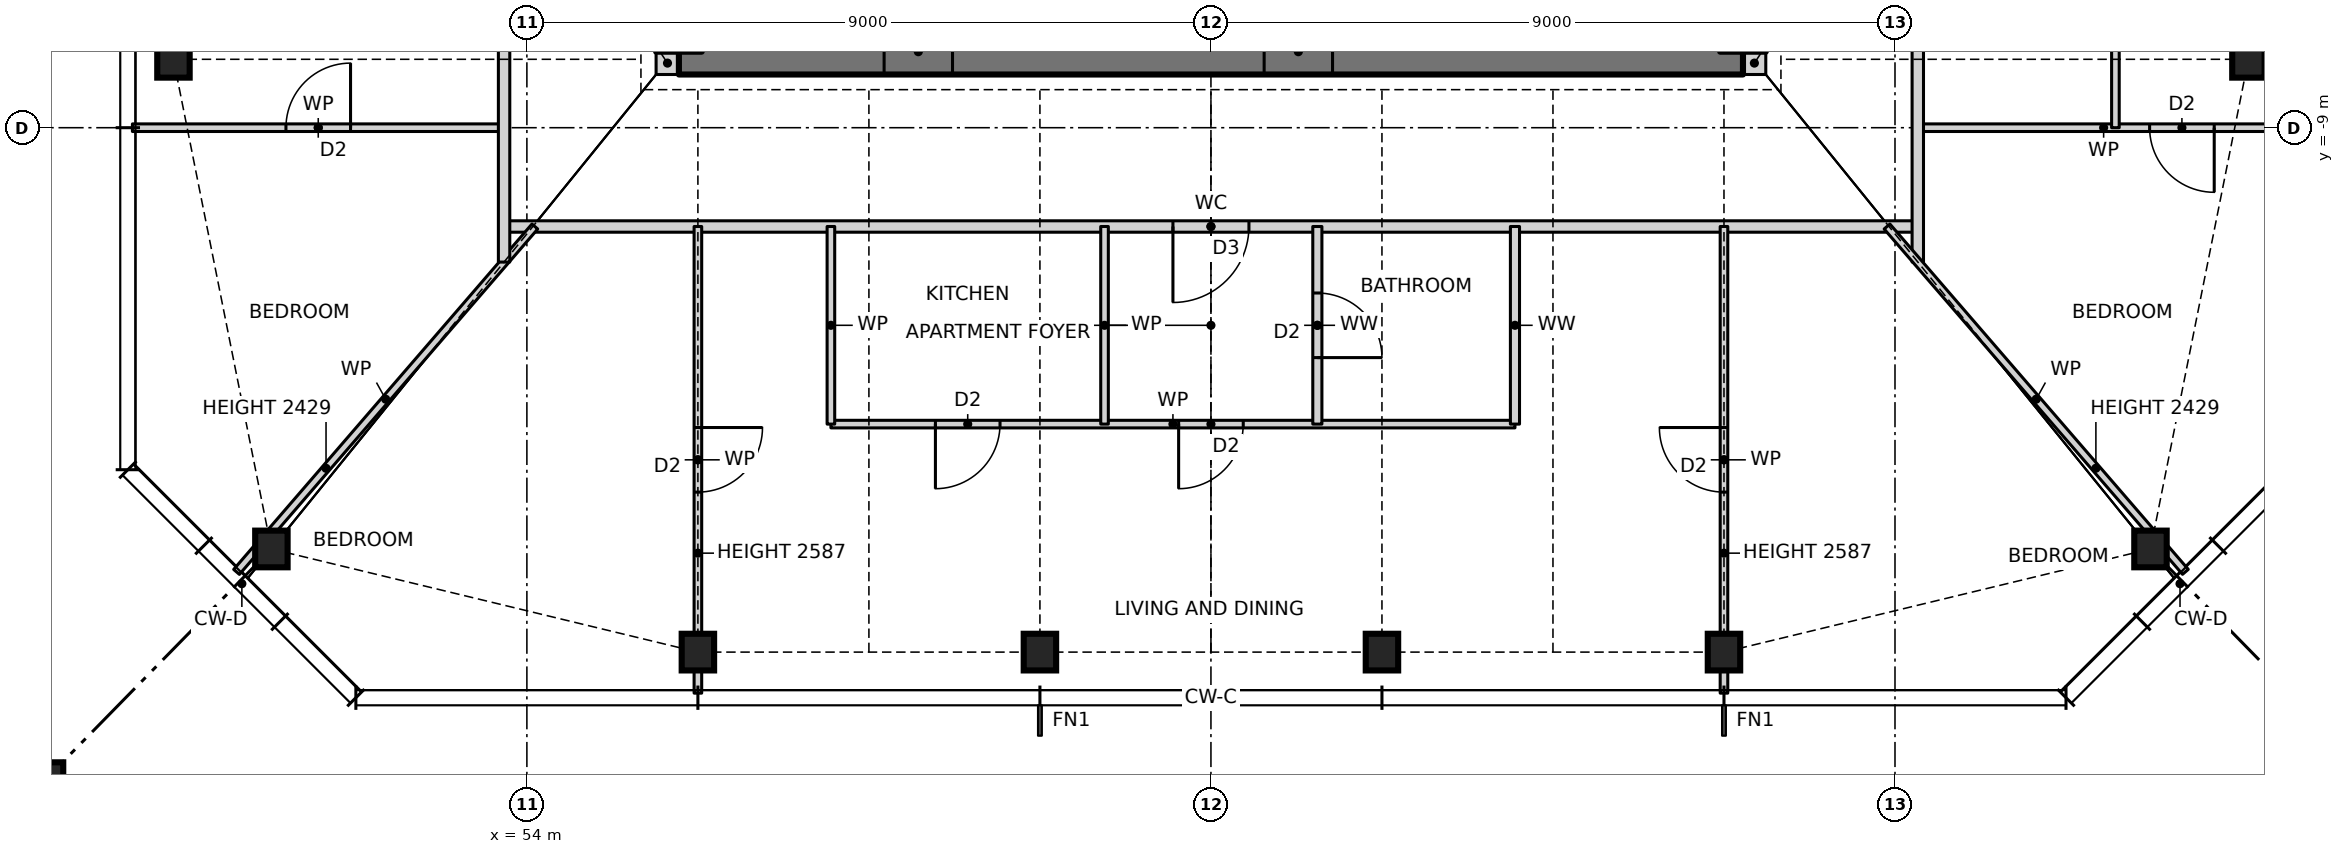
"""IFC4 building model, lengths in metres.
Left out: names, types, materials, properties, quantities, classifications, styles, units other than length and angle.
Written with IfcOpenShell. Run it as: python <this file> out.ifc"""

import sys

from ifc_helpers import new_model, si_unit, direction, frame, frame_2d, origin, origin_2d, place, context, subcontext, project, spatial, rectangle, hollow_rectangle, i_section, extrude, element, fill, save


model = new_model("IFC4")
c1 = context("Model", 3, precision=1e-05, world=origin(), true_north=direction((0.0, 1.0)))
c2 = subcontext(c1, "Body", "Model", "MODEL_VIEW")
j1 = project(units=[si_unit("LENGTHUNIT", "METRE"), si_unit("PLANEANGLEUNIT", "RADIAN")], contexts=[c1])
p1 = place(None, origin())
s1 = spatial("IfcSite", under=j1, at=p1, CompositionType="ELEMENT")
p2 = place(p1, origin())
s2 = spatial("IfcBuilding", under=s1, at=p2, CompositionType="ELEMENT")
p3 = place(p2, frame((0.0, 0.0, 101.5)))
s3 = spatial("IfcBuildingStorey", under=s2, at=p3, CompositionType="ELEMENT", Elevation=101.5)
for number, where, z_axis, x_axis in (
    (1, (50.639, -14.543, 0.0), (0.0, 0.0, 1.0), (1.0, 0.0, 0.0)),
    (2, (56.25, -15.9, 0.0), (0.0, 0.0, 1.0), (1.0, 0.0, 0.0)),
    (3, (60.75, -15.9, 0.0), (0.0, 0.0, 1.0), (1.0, 0.0, 0.0)),
    (4, (65.25, -15.9, 0.0), (0.0, 0.0, 1.0), (1.0, 0.0, 0.0)),
    (5, (69.75, -15.9, 0.0), (0.0, 0.0, 1.0), (1.0, 0.0, 0.0)),
    (6, (75.361, -14.543, 0.0), (0.0, 0.0, 1.0), (1.0, 0.0, 0.0)),
    (7, (76.65, -8.1, 0.0), (0.0, 0.0, 1.0), (1.0, 0.0, 0.0)),
    (8, (49.35, -8.1, 0.0), (0.0, 0.0, 1.0), (1.0, 0.0, 0.0)),
):
    element("IfcColumn", number, at=place(p3, frame(where, z_axis=z_axis, x_axis=x_axis)), inside=s3, PredefinedType="COLUMN", context=c2, shape_type="SweptSolid", body=[
        extrude(i_section(OverallWidth=0.427, OverallDepth=0.483, WebThickness=0.051, FlangeThickness=0.082, at=origin_2d()), origin(), (0.0, 0.0, 1.0), 3.5),
    ])
p4 = place(p3, frame((47.35, -17.9, 0.0), z_axis=(0.0, 0.0, 1.0), x_axis=(1.0, 0.0, 0.0)))
e9 = element("IfcColumn", 9, at=p4, inside=s3, PredefinedType="COLUMN", context=c2, shape_type="SweptSolid", body=[
    extrude(hollow_rectangle(XDim=1.1, YDim=1.1, WallThickness=0.06, at=origin_2d()), origin(), (0.0, 0.0, 1.0), 3.5),
])
for number, where, z_axis, x_axis in (
    (10, (55.7, -8.15, 0.0), (0.0, 0.0, 1.0), (1.0, 0.0, 0.0)),
    (11, (70.0, -8.15, 0.0), (0.0, 0.0, 1.0), (1.0, 0.0, 0.0)),
):
    element("IfcWall", number, at=place(p3, frame(where, z_axis=z_axis, x_axis=x_axis)), inside=s3, PredefinedType="SOLIDWALL", context=c2, shape_type="SweptSolid", body=[
        extrude(rectangle(XDim=0.3, YDim=0.3, at=frame_2d((0.15, 0.0))), origin(), (0.0, 0.0, 1.0), 3.5),
    ])
p5 = place(p3, frame((56.0, -8.0, 0.0), z_axis=(0.0, 0.0, 1.0), x_axis=(1.0, 0.0, 0.0)))
e12 = element("IfcWall", 12, at=p5, inside=s3, PredefinedType="SHEAR", context=c2, shape_type="SweptSolid", body=[
    extrude(rectangle(XDim=14.0, YDim=0.6, at=frame_2d((7.0, 0.0))), origin(), (0.0, 0.0, 1.0), 3.5),
])
p6 = place(p5, frame((2.7, 0.0, 0.0)))
e13 = element("IfcOpeningElement", 13, at=p6, cuts=e12, PredefinedType="OPENING", context=c2, shape_type="SweptSolid", body=[
    extrude(rectangle(XDim=0.9, YDim=2.1, at=frame_2d((0.45, 1.05))), frame((0.0, 0.31, 0.0), z_axis=(0.0, -1.0, 0.0), x_axis=(1.0, 0.0, 0.0)), (0.0, 0.0, 1.0), 0.62),
])
p7 = place(p5, frame((7.7, 0.0, 0.0)))
e14 = element("IfcOpeningElement", 14, at=p7, cuts=e12, PredefinedType="OPENING", context=c2, shape_type="SweptSolid", body=[
    extrude(rectangle(XDim=0.9, YDim=2.1, at=frame_2d((0.45, 1.05))), frame((0.0, 0.31, 0.0), z_axis=(0.0, -1.0, 0.0), x_axis=(1.0, 0.0, 0.0)), (0.0, 0.0, 1.0), 0.62),
])
p8 = place(p3, frame((58.0, -12.9, 0.0), z_axis=(0.0, 0.0, 1.0), x_axis=(1.0, 0.0, 0.0)))
e15 = element("IfcWall", 15, at=p8, inside=s3, PredefinedType="PARTITIONING", context=c2, shape_type="SweptSolid", body=[
    extrude(rectangle(XDim=9.0, YDim=0.1, at=frame_2d((4.5, 0.0))), origin(), (0.0, 0.0, 1.0), 3.27),
])
p9 = place(p8, frame((1.375, 0.0, 0.0)))
e16 = element("IfcOpeningElement", 16, at=p9, cuts=e15, PredefinedType="OPENING", context=c2, shape_type="SweptSolid", body=[
    extrude(rectangle(XDim=0.85, YDim=2.1, at=frame_2d((0.425, 1.05))), frame((0.0, 0.06, 0.0), z_axis=(0.0, -1.0, 0.0), x_axis=(1.0, 0.0, 0.0)), (0.0, 0.0, 1.0), 0.12),
])
p10 = place(p8, frame((4.575, 0.0, 0.0)))
e17 = element("IfcOpeningElement", 17, at=p10, cuts=e15, PredefinedType="OPENING", context=c2, shape_type="SweptSolid", body=[
    extrude(rectangle(XDim=0.85, YDim=2.1, at=frame_2d((0.425, 1.05))), frame((0.0, 0.06, 0.0), z_axis=(0.0, -1.0, 0.0), x_axis=(1.0, 0.0, 0.0)), (0.0, 0.0, 1.0), 0.12),
])
p11 = place(p3, frame((53.7, -10.3, 0.0), z_axis=(0.0, 0.0, 1.0), x_axis=(1.0, 0.0, 0.0)))
e18 = element("IfcWall", 18, at=p11, inside=s3, PredefinedType="PARTITIONING", context=c2, shape_type="SweptSolid", body=[
    extrude(rectangle(XDim=18.6, YDim=0.15, at=frame_2d((9.3, 0.0))), origin(), (0.0, 0.0, 1.0), 3.27),
])
p12 = place(p11, frame((8.8, 0.0, 0.0)))
e19 = element("IfcOpeningElement", 19, at=p12, cuts=e18, PredefinedType="OPENING", context=c2, shape_type="SweptSolid", body=[
    extrude(rectangle(XDim=1.0, YDim=2.1, at=frame_2d((0.5, 1.05))), frame((0.0, 0.085, 0.0), z_axis=(0.0, -1.0, 0.0), x_axis=(1.0, 0.0, 0.0)), (0.0, 0.0, 1.0), 0.17),
])
p13 = place(p3, frame((48.81, -9.0, 0.0), z_axis=(0.0, 0.0, 1.0), x_axis=(1.0, 0.0, 0.0)))
e20 = element("IfcWall", 20, at=p13, inside=s3, PredefinedType="PARTITIONING", context=c2, shape_type="SweptSolid", body=[
    extrude(rectangle(XDim=4.89, YDim=0.1, at=frame_2d((2.445, 0.0))), origin(), (0.0, 0.0, 1.0), 3.27),
])
p14 = place(p13, frame((2.02, 0.0, 0.0)))
e21 = element("IfcOpeningElement", 21, at=p14, cuts=e20, PredefinedType="OPENING", context=c2, shape_type="SweptSolid", body=[
    extrude(rectangle(XDim=0.85, YDim=2.1, at=frame_2d((0.425, 1.05))), frame((0.0, 0.06, 0.0), z_axis=(0.0, -1.0, 0.0), x_axis=(1.0, 0.0, 0.0)), (0.0, 0.0, 1.0), 0.12),
])
p15 = place(p3, frame((72.3, -9.0, 0.0), z_axis=(0.0, 0.0, 1.0), x_axis=(1.0, 0.0, 0.0)))
e22 = element("IfcWall", 22, at=p15, inside=s3, PredefinedType="PARTITIONING", context=c2, shape_type="SweptSolid", body=[
    extrude(rectangle(XDim=4.89, YDim=0.1, at=frame_2d((2.445, 0.0))), origin(), (0.0, 0.0, 1.0), 3.27),
])
p16 = place(p15, frame((3.05, 0.0, 0.0)))
e23 = element("IfcOpeningElement", 23, at=p16, cuts=e22, PredefinedType="OPENING", context=c2, shape_type="SweptSolid", body=[
    extrude(rectangle(XDim=0.85, YDim=2.1, at=frame_2d((0.425, 1.05))), frame((0.0, 0.06, 0.0), z_axis=(0.0, -1.0, 0.0), x_axis=(1.0, 0.0, 0.0)), (0.0, 0.0, 1.0), 0.12),
])
p17 = place(p3, frame((50.18, -14.845, 0.0), z_axis=(0.0, 0.0, 1.0), x_axis=(0.653585997703, 0.756852260092, 0.0)))
e24 = element("IfcWall", 24, at=p17, inside=s3, PredefinedType="PARTITIONING", context=c2, shape_type="SweptSolid", body=[
    extrude(rectangle(XDim=6.005, YDim=0.1, at=frame_2d((3.002, 0.0))), origin(), (0.0, 0.0, 1.0), 2.429),
])
p18 = place(p3, frame((74.9, -9.0, 0.0), z_axis=(0.0, 0.0, 1.0), x_axis=(0.0, 1.0, 0.0)))
e25 = element("IfcWall", 25, at=p18, inside=s3, PredefinedType="PARTITIONING", context=c2, shape_type="SweptSolid", body=[
    extrude(rectangle(XDim=9.0, YDim=0.1, at=frame_2d((4.5, 0.0))), origin(), (0.0, 0.0, 1.0), 3.27),
])
p19 = place(p18, frame((1.375, 0.0, 0.0)))
e26 = element("IfcOpeningElement", 26, at=p19, cuts=e25, PredefinedType="OPENING", context=c2, shape_type="SweptSolid", body=[
    extrude(rectangle(XDim=0.85, YDim=2.1, at=frame_2d((0.425, 1.05))), frame((0.0, 0.06, 0.0), z_axis=(0.0, -1.0, 0.0), x_axis=(1.0, 0.0, 0.0)), (0.0, 0.0, 1.0), 0.12),
])
p20 = place(p18, frame((4.575, 0.0, 0.0)))
e27 = element("IfcOpeningElement", 27, at=p20, cuts=e25, PredefinedType="OPENING", context=c2, shape_type="SweptSolid", body=[
    extrude(rectangle(XDim=0.85, YDim=2.1, at=frame_2d((0.425, 1.05))), frame((0.0, 0.06, 0.0), z_axis=(0.0, -1.0, 0.0), x_axis=(1.0, 0.0, 0.0)), (0.0, 0.0, 1.0), 0.12),
])
p21 = place(p3, frame((72.3, -10.768, 0.0), z_axis=(0.0, 0.0, 1.0), x_axis=(0.0, 1.0, 0.0)))
e28 = element("IfcWall", 28, at=p21, inside=s3, PredefinedType="PARTITIONING", context=c2, shape_type="SweptSolid", body=[
    extrude(rectangle(XDim=21.668, YDim=0.15, at=frame_2d((10.834, 0.0))), origin(), (0.0, 0.0, 1.0), 3.27),
])
p22 = place(p21, frame((6.268, 0.0, 0.0)))
e29 = element("IfcOpeningElement", 29, at=p22, cuts=e28, PredefinedType="OPENING", context=c2, shape_type="SweptSolid", body=[
    extrude(rectangle(XDim=1.0, YDim=2.1, at=frame_2d((0.5, 1.05))), frame((0.0, 0.085, 0.0), z_axis=(0.0, -1.0, 0.0), x_axis=(1.0, 0.0, 0.0)), (0.0, 0.0, 1.0), 0.17),
])
p23 = place(p21, frame((16.168, 0.0, 0.0)))
e30 = element("IfcOpeningElement", 30, at=p23, cuts=e28, PredefinedType="OPENING", context=c2, shape_type="SweptSolid", body=[
    extrude(rectangle(XDim=1.0, YDim=2.1, at=frame_2d((0.5, 1.05))), frame((0.0, 0.085, 0.0), z_axis=(0.0, -1.0, 0.0), x_axis=(1.0, 0.0, 0.0)), (0.0, 0.0, 1.0), 0.17),
])
p24 = place(p3, frame((69.75, -16.44, 0.0), z_axis=(0.0, 0.0, 1.0), x_axis=(0.0, 1.0, 0.0)))
e31 = element("IfcWall", 31, at=p24, inside=s3, PredefinedType="PARTITIONING", context=c2, shape_type="SweptSolid", body=[
    extrude(rectangle(XDim=6.14, YDim=0.1, at=frame_2d((3.07, 0.0))), origin(), (0.0, 0.0, 1.0), 2.587),
])
p25 = place(p24, frame((2.645, 0.0, 0.0)))
e32 = element("IfcOpeningElement", 32, at=p25, cuts=e31, PredefinedType="OPENING", context=c2, shape_type="SweptSolid", body=[
    extrude(rectangle(XDim=0.85, YDim=2.1, at=frame_2d((0.425, 1.05))), frame((0.0, 0.06, 0.0), z_axis=(0.0, -1.0, 0.0), x_axis=(1.0, 0.0, 0.0)), (0.0, 0.0, 1.0), 0.12),
])
p26 = place(p3, frame((67.0, -12.9, 0.0), z_axis=(0.0, 0.0, 1.0), x_axis=(0.0, 1.0, 0.0)))
e33 = element("IfcWall", 33, at=p26, inside=s3, PredefinedType="PARTITIONING", context=c2, shape_type="SweptSolid", body=[
    extrude(rectangle(XDim=2.6, YDim=0.12, at=frame_2d((1.3, 0.0))), origin(), (0.0, 0.0, 1.0), 3.27),
])
p27 = place(p3, frame((64.4, -12.9, 0.0), z_axis=(0.0, 0.0, 1.0), x_axis=(0.0, 1.0, 0.0)))
e34 = element("IfcWall", 34, at=p27, inside=s3, PredefinedType="PARTITIONING", context=c2, shape_type="SweptSolid", body=[
    extrude(rectangle(XDim=2.6, YDim=0.12, at=frame_2d((1.3, 0.0))), origin(), (0.0, 0.0, 1.0), 3.27),
])
p28 = place(p27, frame((0.875, 0.0, 0.0)))
e35 = element("IfcOpeningElement", 35, at=p28, cuts=e34, PredefinedType="OPENING", context=c2, shape_type="SweptSolid", body=[
    extrude(rectangle(XDim=0.85, YDim=2.1, at=frame_2d((0.425, 1.05))), frame((0.0, 0.07, 0.0), z_axis=(0.0, -1.0, 0.0), x_axis=(1.0, 0.0, 0.0)), (0.0, 0.0, 1.0), 0.14),
])
for number, where, z_axis, x_axis in (
    (36, (61.6, -12.9, 0.0), (0.0, 0.0, 1.0), (0.0, 1.0, 0.0)),
    (37, (58.0, -12.9, 0.0), (0.0, 0.0, 1.0), (0.0, 1.0, 0.0)),
):
    element("IfcWall", number, at=place(p3, frame(where, z_axis=z_axis, x_axis=x_axis)), inside=s3, PredefinedType="PARTITIONING", context=c2, shape_type="SweptSolid", body=[
        extrude(rectangle(XDim=2.6, YDim=0.1, at=frame_2d((1.3, 0.0))), origin(), (0.0, 0.0, 1.0), 3.27),
    ])
p29 = place(p3, frame((56.25, -16.44, 0.0), z_axis=(0.0, 0.0, 1.0), x_axis=(0.0, 1.0, 0.0)))
e38 = element("IfcWall", 38, at=p29, inside=s3, PredefinedType="PARTITIONING", context=c2, shape_type="SweptSolid", body=[
    extrude(rectangle(XDim=6.14, YDim=0.1, at=frame_2d((3.07, 0.0))), origin(), (0.0, 0.0, 1.0), 2.587),
])
p30 = place(p29, frame((2.645, 0.0, 0.0)))
e39 = element("IfcOpeningElement", 39, at=p30, cuts=e38, PredefinedType="OPENING", context=c2, shape_type="SweptSolid", body=[
    extrude(rectangle(XDim=0.85, YDim=2.1, at=frame_2d((0.425, 1.05))), frame((0.0, 0.06, 0.0), z_axis=(0.0, -1.0, 0.0), x_axis=(1.0, 0.0, 0.0)), (0.0, 0.0, 1.0), 0.12),
])
p31 = place(p3, frame((53.7, -10.768, 0.0), z_axis=(0.0, 0.0, 1.0), x_axis=(0.0, 1.0, 0.0)))
e40 = element("IfcWall", 40, at=p31, inside=s3, PredefinedType="PARTITIONING", context=c2, shape_type="SweptSolid", body=[
    extrude(rectangle(XDim=21.668, YDim=0.15, at=frame_2d((10.834, 0.0))), origin(), (0.0, 0.0, 1.0), 3.27),
])
p32 = place(p31, frame((10.268, 0.0, 0.0)))
e41 = element("IfcOpeningElement", 41, at=p32, cuts=e40, PredefinedType="OPENING", context=c2, shape_type="SweptSolid", body=[
    extrude(rectangle(XDim=1.0, YDim=2.1, at=frame_2d((0.5, 1.05))), frame((0.0, 0.085, 0.0), z_axis=(0.0, -1.0, 0.0), x_axis=(1.0, 0.0, 0.0)), (0.0, 0.0, 1.0), 0.17),
])
p33 = place(p3, frame((75.821, -14.844, 0.0), z_axis=(0.0, 0.0, 1.0), x_axis=(-0.65378286253, 0.756682211144, 0.0)))
e42 = element("IfcWall", 42, at=p33, inside=s3, PredefinedType="PARTITIONING", context=c2, shape_type="SweptSolid", body=[
    extrude(rectangle(XDim=6.005, YDim=0.1, at=frame_2d((3.002, 0.0))), origin(), (0.0, 0.0, 1.0), 2.429),
])
p34 = place(p9, frame((0.85, 0.0, 0.0), z_axis=(0.0, 0.0, 1.0), x_axis=(-1.0, 0.0, 0.0)))
e43 = element("IfcDoor", 43, at=p34, inside=s3, OperationType="SINGLE_SWING_RIGHT", PredefinedType="DOOR", context=c2, shape_type="SweptSolid", body=[
    extrude(rectangle(XDim=0.85, YDim=2.1, at=frame_2d((0.425, 1.05))), frame((0.0, 0.025, 0.0), z_axis=(0.0, -1.0, 0.0), x_axis=(1.0, 0.0, 0.0)), (0.0, 0.0, 1.0), 0.05),
])
fill(e16, e43)
p35 = place(p12, frame((1.0, 0.0, 0.0), z_axis=(0.0, 0.0, 1.0), x_axis=(-1.0, 0.0, 0.0)))
e44 = element("IfcDoor", 44, at=p35, inside=s3, OperationType="SINGLE_SWING_RIGHT", PredefinedType="DOOR", context=c2, shape_type="SweptSolid", body=[
    extrude(rectangle(XDim=1.0, YDim=2.1, at=frame_2d((0.5, 1.05))), frame((0.0, 0.025, 0.0), z_axis=(0.0, -1.0, 0.0), x_axis=(1.0, 0.0, 0.0)), (0.0, 0.0, 1.0), 0.05),
])
fill(e19, e44)
p36 = place(p10, frame((0.85, 0.0, 0.0), z_axis=(0.0, 0.0, 1.0), x_axis=(-1.0, 0.0, 0.0)))
e45 = element("IfcDoor", 45, at=p36, inside=s3, OperationType="SINGLE_SWING_RIGHT", PredefinedType="DOOR", context=c2, shape_type="SweptSolid", body=[
    extrude(rectangle(XDim=0.85, YDim=2.1, at=frame_2d((0.425, 1.05))), frame((0.0, 0.025, 0.0), z_axis=(0.0, -1.0, 0.0), x_axis=(1.0, 0.0, 0.0)), (0.0, 0.0, 1.0), 0.05),
])
fill(e17, e45)
p37 = place(p28, frame((0.85, 0.0, 0.0), z_axis=(0.0, 0.0, 1.0), x_axis=(-1.0, 0.0, 0.0)))
e46 = element("IfcDoor", 46, at=p37, inside=s3, OperationType="SINGLE_SWING_RIGHT", PredefinedType="DOOR", context=c2, shape_type="SweptSolid", body=[
    extrude(rectangle(XDim=0.85, YDim=2.1, at=frame_2d((0.425, 1.05))), frame((0.0, 0.025, 0.0), z_axis=(0.0, -1.0, 0.0), x_axis=(1.0, 0.0, 0.0)), (0.0, 0.0, 1.0), 0.05),
])
fill(e35, e46)
p38 = place(p30, frame((0.85, 0.0, 0.0), z_axis=(0.0, 0.0, 1.0), x_axis=(-1.0, 0.0, 0.0)))
e47 = element("IfcDoor", 47, at=p38, inside=s3, OperationType="SINGLE_SWING_LEFT", PredefinedType="DOOR", context=c2, shape_type="SweptSolid", body=[
    extrude(rectangle(XDim=0.85, YDim=2.1, at=frame_2d((0.425, 1.05))), frame((0.0, 0.025, 0.0), z_axis=(0.0, -1.0, 0.0), x_axis=(1.0, 0.0, 0.0)), (0.0, 0.0, 1.0), 0.05),
])
fill(e39, e47)
p39 = place(p25, origin())
e48 = element("IfcDoor", 48, at=p39, inside=s3, OperationType="SINGLE_SWING_RIGHT", PredefinedType="DOOR", context=c2, shape_type="SweptSolid", body=[
    extrude(rectangle(XDim=0.85, YDim=2.1, at=frame_2d((0.425, 1.05))), frame((0.0, 0.025, 0.0), z_axis=(0.0, -1.0, 0.0), x_axis=(1.0, 0.0, 0.0)), (0.0, 0.0, 1.0), 0.05),
])
fill(e32, e48)
p40 = place(p16, frame((0.85, 0.0, 0.0), z_axis=(0.0, 0.0, 1.0), x_axis=(-1.0, 0.0, 0.0)))
e49 = element("IfcDoor", 49, at=p40, inside=s3, OperationType="SINGLE_SWING_LEFT", PredefinedType="DOOR", context=c2, shape_type="SweptSolid", body=[
    extrude(rectangle(XDim=0.85, YDim=2.1, at=frame_2d((0.425, 1.05))), frame((0.0, 0.025, 0.0), z_axis=(0.0, -1.0, 0.0), x_axis=(1.0, 0.0, 0.0)), (0.0, 0.0, 1.0), 0.05),
])
fill(e23, e49)
p41 = place(p14, origin())
e50 = element("IfcDoor", 50, at=p41, inside=s3, OperationType="SINGLE_SWING_RIGHT", PredefinedType="DOOR", context=c2, shape_type="SweptSolid", body=[
    extrude(rectangle(XDim=0.85, YDim=2.1, at=frame_2d((0.425, 1.05))), frame((0.0, 0.025, 0.0), z_axis=(0.0, -1.0, 0.0), x_axis=(1.0, 0.0, 0.0)), (0.0, 0.0, 1.0), 0.05),
])
fill(e21, e50)
p42 = place(p6, origin())
e51 = element("IfcDoor", 51, at=p42, inside=s3, OperationType="SINGLE_SWING_LEFT", PredefinedType="DOOR", context=c2, shape_type="SweptSolid", body=[
    extrude(rectangle(XDim=0.9, YDim=2.1, at=frame_2d((0.45, 1.05))), frame((0.0, 0.025, 0.0), z_axis=(0.0, -1.0, 0.0), x_axis=(1.0, 0.0, 0.0)), (0.0, 0.0, 1.0), 0.05),
])
fill(e13, e51)
p43 = place(p7, origin())
e52 = element("IfcDoor", 52, at=p43, inside=s3, OperationType="SINGLE_SWING_LEFT", PredefinedType="DOOR", context=c2, shape_type="SweptSolid", body=[
    extrude(rectangle(XDim=0.9, YDim=2.1, at=frame_2d((0.45, 1.05))), frame((0.0, 0.025, 0.0), z_axis=(0.0, -1.0, 0.0), x_axis=(1.0, 0.0, 0.0)), (0.0, 0.0, 1.0), 0.05),
])
fill(e14, e52)
save(model, sys.argv[1])
